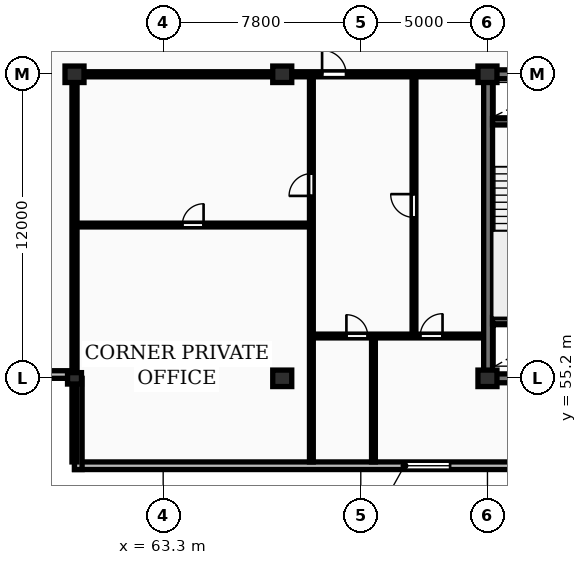
"""IFC4 building model, lengths in metres.
Left out: names, types, materials, properties, quantities, classifications, styles, units other than length and angle.
Written with IfcOpenShell. Run it as: python <this file> out.ifc"""

import sys

from ifc_helpers import new_model, si_unit, direction, frame, frame_2d, origin, origin_2d, place, context, subcontext, project, spatial, rectangle, extrude, element, fill, save


model = new_model("IFC4")
c1 = context("Model", 3, precision=1e-05, world=origin(), true_north=direction((0.0, 1.0)))
c2 = subcontext(c1, "Body", "Model", "MODEL_VIEW")
j1 = project(units=[si_unit("LENGTHUNIT", "METRE"), si_unit("PLANEANGLEUNIT", "RADIAN")], contexts=[c1])
p1 = place(None, origin())
s1 = spatial("IfcSite", under=j1, at=p1, CompositionType="ELEMENT")
p2 = place(p1, origin())
s2 = spatial("IfcBuilding", under=s1, at=p2, CompositionType="ELEMENT")
p3 = place(p2, frame((0.0, 0.0, 242.45)))
s3 = spatial("IfcBuildingStorey", under=s2, at=p3, CompositionType="ELEMENT", Elevation=242.45)
p4 = place(p3, frame((59.8, 55.2, 0.0), z_axis=(0.0, 0.0, 1.0), x_axis=(1.0, 0.0, 0.0)))
e1 = element("IfcColumn", 1, at=p4, inside=s3, PredefinedType="PILASTER", context=c2, shape_type="SweptSolid", body=[
    extrude(rectangle(XDim=0.55, YDim=0.45, at=origin_2d()), origin(), (0.0, 0.0, 1.0), 3.45),
])
for number, where, z_axis, x_axis in (
    (2, (59.8, 67.2, 0.0), (0.0, 0.0, 1.0), (1.0, 0.0, 0.0)),
    (3, (68.0, 55.2, 0.0), (0.0, 0.0, 1.0), (1.0, 0.0, 0.0)),
    (4, (68.0, 67.2, 0.0), (0.0, 0.0, 1.0), (1.0, 0.0, 0.0)),
    (5, (76.1, 55.2, 0.0), (0.0, 0.0, 1.0), (1.0, 0.0, 0.0)),
    (6, (76.1, 67.2, 0.0), (0.0, 0.0, 1.0), (1.0, 0.0, 0.0)),
):
    element("IfcColumn", number, at=place(p3, frame(where, z_axis=z_axis, x_axis=x_axis)), inside=s3, PredefinedType="COLUMN", context=c2, shape_type="SweptSolid", body=[
        extrude(rectangle(XDim=0.75, YDim=0.65, at=origin_2d()), origin(), (0.0, 0.0, 1.0), 3.45),
    ])
p5 = place(p3, frame((59.8, 51.75, 0.0), z_axis=(0.0, 0.0, 1.0), x_axis=(1.0, 0.0, 0.0)))
e7 = element("IfcWall", 7, at=p5, inside=s3, PredefinedType="STANDARD", context=c2, shape_type="SweptSolid", body=[
    extrude(rectangle(XDim=68.6, YDim=0.3, at=frame_2d((34.3, 0.0))), origin(), (0.0, 0.0, 1.0), 3.17),
])
p6 = place(p5, frame((13.025, 0.0, 0.85)))
e8 = element("IfcOpeningElement", 8, at=p6, cuts=e7, PredefinedType="OPENING", context=c2, shape_type="SweptSolid", body=[
    extrude(rectangle(XDim=1.8, YDim=1.8, at=frame_2d((0.9, 0.9))), frame((0.0, 0.16, 0.0), z_axis=(0.0, -1.0, 0.0), x_axis=(1.0, 0.0, 0.0)), (0.0, 0.0, 1.0), 0.32),
])
p7 = place(p5, frame((56.375, 0.0, 0.85)))
e9 = element("IfcOpeningElement", 9, at=p7, cuts=e7, PredefinedType="OPENING", context=c2, shape_type="SweptSolid", body=[
    extrude(rectangle(XDim=1.8, YDim=1.8, at=frame_2d((0.9, 0.9))), frame((0.0, 0.16, 0.0), z_axis=(0.0, -1.0, 0.0), x_axis=(1.0, 0.0, 0.0)), (0.0, 0.0, 1.0), 0.32),
])
p8 = place(p3, frame((56.2, 55.35, 0.0), z_axis=(0.0, 0.0, 1.0), x_axis=(1.0, 0.0, 0.0)))
e10 = element("IfcWall", 10, at=p8, inside=s3, PredefinedType="STANDARD", context=c2, shape_type="SweptSolid", body=[
    extrude(rectangle(XDim=3.6, YDim=0.3, at=frame_2d((1.8, 0.0))), origin(), (0.0, 0.0, 1.0), 3.17),
])
p9 = place(p3, frame((59.95, 55.2, 0.0), z_axis=(0.0, 0.0, 1.0), x_axis=(0.0, -1.0, 0.0)))
e11 = element("IfcWall", 11, at=p9, inside=s3, PredefinedType="STANDARD", context=c2, shape_type="SweptSolid", body=[
    extrude(rectangle(XDim=3.6, YDim=0.3, at=frame_2d((1.8, 0.0))), origin(), (0.0, 0.0, 1.0), 3.17),
])
p10 = place(p3, frame((75.95, 55.2, 0.0), z_axis=(0.0, 0.0, 1.0), x_axis=(1.0, 0.0, 0.0)))
e12 = element("IfcWall", 12, at=p10, inside=s3, PredefinedType="SHEAR", context=c2, shape_type="SweptSolid", body=[
    extrude(rectangle(XDim=36.3, YDim=0.35, at=frame_2d((18.15, 0.0))), origin(), (0.0, 0.0, 1.0), 3.45),
])
p11 = place(p3, frame((76.125, 55.375, 0.0), z_axis=(0.0, 0.0, 1.0), x_axis=(0.0, 1.0, 0.0)))
e13 = element("IfcWall", 13, at=p11, inside=s3, PredefinedType="SHEAR", context=c2, shape_type="SweptSolid", body=[
    extrude(rectangle(XDim=11.65, YDim=0.35, at=frame_2d((5.825, 0.0))), origin(), (0.0, 0.0, 1.0), 3.45),
])
p12 = place(p3, frame((75.95, 67.2, 0.0), z_axis=(0.0, 0.0, 1.0), x_axis=(1.0, 0.0, 0.0)))
e14 = element("IfcWall", 14, at=p12, inside=s3, PredefinedType="SHEAR", context=c2, shape_type="SweptSolid", body=[
    extrude(rectangle(XDim=36.3, YDim=0.35, at=frame_2d((18.15, 0.0))), origin(), (0.0, 0.0, 1.0), 3.45),
])
p13 = place(p12, frame((5.25, 0.0, 0.0)))
e15 = element("IfcOpeningElement", 15, at=p13, cuts=e14, PredefinedType="OPENING", context=c2, shape_type="SweptSolid", body=[
    extrude(rectangle(XDim=1.0, YDim=2.15, at=frame_2d((0.5, 1.075))), frame((0.0, 0.185, 0.0), z_axis=(0.0, -1.0, 0.0), x_axis=(1.0, 0.0, 0.0)), (0.0, 0.0, 1.0), 0.37),
])
p14 = place(p12, frame((21.6, 0.0, 0.0)))
e16 = element("IfcOpeningElement", 16, at=p14, cuts=e14, PredefinedType="OPENING", context=c2, shape_type="SweptSolid", body=[
    extrude(rectangle(XDim=1.5, YDim=2.2, at=frame_2d((0.75, 1.1))), frame((0.0, 0.185, 0.0), z_axis=(0.0, -1.0, 0.0), x_axis=(1.0, 0.0, 0.0)), (0.0, 0.0, 1.0), 0.37),
])
p15 = place(p12, frame((30.45, 0.0, 0.0)))
e17 = element("IfcOpeningElement", 17, at=p15, cuts=e14, PredefinedType="OPENING", context=c2, shape_type="SweptSolid", body=[
    extrude(rectangle(XDim=1.0, YDim=2.15, at=frame_2d((0.5, 1.075))), frame((0.0, 0.185, 0.0), z_axis=(0.0, -1.0, 0.0), x_axis=(1.0, 0.0, 0.0)), (0.0, 0.0, 1.0), 0.37),
])
for number, where, z_axis, x_axis in (
    (18, (76.3, 57.475, 0.0), (0.0, 0.0, 1.0), (1.0, 0.0, 0.0)),
    (19, (76.3, 65.325, 0.0), (0.0, 0.0, 1.0), (1.0, 0.0, 0.0)),
):
    element("IfcWall", number, at=place(p3, frame(where, z_axis=z_axis, x_axis=x_axis)), inside=s3, PredefinedType="SHEAR", context=c2, shape_type="SweptSolid", body=[
        extrude(rectangle(XDim=3.24, YDim=0.25, at=frame_2d((1.62, 0.0))), origin(), (0.0, 0.0, 1.0), 3.45),
    ])
p16 = place(p3, frame((59.8, 51.9, 0.0), z_axis=(0.0, 0.0, 1.0), x_axis=(0.0, 1.0, 0.0)))
e20 = element("IfcWall", 20, at=p16, inside=s3, PredefinedType="PARTITIONING", context=c2, shape_type="SweptSolid", body=[
    extrude(rectangle(XDim=15.3, YDim=0.2, at=frame_2d((7.65, 0.0))), origin(), (0.0, 0.0, 1.0), 2.477),
])
p17 = place(p3, frame((59.8, 61.25, 0.0), z_axis=(0.0, 0.0, 1.0), x_axis=(1.0, 0.0, 0.0)))
e21 = element("IfcWall", 21, at=p17, inside=s3, PredefinedType="PARTITIONING", context=c2, shape_type="SweptSolid", body=[
    extrude(rectangle(XDim=9.35, YDim=0.15, at=frame_2d((4.675, 0.0))), origin(), (0.0, 0.0, 1.0), 3.17),
])
p18 = place(p17, frame((4.255, 0.0, 0.0)))
e22 = element("IfcOpeningElement", 22, at=p18, cuts=e21, PredefinedType="OPENING", context=c2, shape_type="SweptSolid", body=[
    extrude(rectangle(XDim=0.84, YDim=2.04, at=frame_2d((0.42, 1.02))), frame((0.0, 0.085, 0.0), z_axis=(0.0, -1.0, 0.0), x_axis=(1.0, 0.0, 0.0)), (0.0, 0.0, 1.0), 0.17),
])
p19 = place(p3, frame((69.15, 51.9, 0.0), z_axis=(0.0, 0.0, 1.0), x_axis=(0.0, 1.0, 0.0)))
e23 = element("IfcWall", 23, at=p19, inside=s3, PredefinedType="PARTITIONING", context=c2, shape_type="SweptSolid", body=[
    extrude(rectangle(XDim=15.25, YDim=0.15, at=frame_2d((7.625, 0.0))), origin(), (0.0, 0.0, 1.0), 3.17),
])
p20 = place(p19, frame((10.5, 0.0, 0.0)))
e24 = element("IfcOpeningElement", 24, at=p20, cuts=e23, PredefinedType="OPENING", context=c2, shape_type="SweptSolid", body=[
    extrude(rectangle(XDim=0.88, YDim=2.06, at=frame_2d((0.44, 1.03))), frame((0.0, 0.085, 0.0), z_axis=(0.0, -1.0, 0.0), x_axis=(1.0, 0.0, 0.0)), (0.0, 0.0, 1.0), 0.17),
])
p21 = place(p3, frame((73.2, 56.87, 0.0), z_axis=(0.0, 0.0, 1.0), x_axis=(0.0, 1.0, 0.0)))
e25 = element("IfcWall", 25, at=p21, inside=s3, PredefinedType="PARTITIONING", context=c2, shape_type="SweptSolid", body=[
    extrude(rectangle(XDim=10.28, YDim=0.15, at=frame_2d((5.14, 0.0))), origin(), (0.0, 0.0, 1.0), 3.17),
])
p22 = place(p21, frame((4.68, 0.0, 0.0)))
e26 = element("IfcOpeningElement", 26, at=p22, cuts=e25, PredefinedType="OPENING", context=c2, shape_type="SweptSolid", body=[
    extrude(rectangle(XDim=0.92, YDim=2.08, at=frame_2d((0.46, 1.04))), frame((0.0, 0.085, 0.0), z_axis=(0.0, -1.0, 0.0), x_axis=(1.0, 0.0, 0.0)), (0.0, 0.0, 1.0), 0.17),
])
p23 = place(p3, frame((71.6, 51.9, 0.0), z_axis=(0.0, 0.0, 1.0), x_axis=(0.0, 1.0, 0.0)))
e27 = element("IfcWall", 27, at=p23, inside=s3, PredefinedType="PARTITIONING", context=c2, shape_type="SweptSolid", body=[
    extrude(rectangle(XDim=4.97, YDim=0.15, at=frame_2d((2.485, 0.0))), origin(), (0.0, 0.0, 1.0), 3.17),
])
p24 = place(p3, frame((69.17, 56.87, 0.0), z_axis=(0.0, 0.0, 1.0), x_axis=(1.0, 0.0, 0.0)))
e28 = element("IfcWall", 28, at=p24, inside=s3, PredefinedType="PARTITIONING", context=c2, shape_type="SweptSolid", body=[
    extrude(rectangle(XDim=6.76, YDim=0.15, at=frame_2d((3.38, 0.0))), origin(), (0.0, 0.0, 1.0), 3.17),
])
p25 = place(p24, frame((1.362, 0.0, 0.0)))
e29 = element("IfcOpeningElement", 29, at=p25, cuts=e28, PredefinedType="OPENING", context=c2, shape_type="SweptSolid", body=[
    extrude(rectangle(XDim=0.84, YDim=2.04, at=frame_2d((0.42, 1.02))), frame((0.0, 0.085, 0.0), z_axis=(0.0, -1.0, 0.0), x_axis=(1.0, 0.0, 0.0)), (0.0, 0.0, 1.0), 0.17),
])
p26 = place(p24, frame((4.277, 0.0, 0.0)))
e30 = element("IfcOpeningElement", 30, at=p26, cuts=e28, PredefinedType="OPENING", context=c2, shape_type="SweptSolid", body=[
    extrude(rectangle(XDim=0.88, YDim=2.06, at=frame_2d((0.44, 1.03))), frame((0.0, 0.085, 0.0), z_axis=(0.0, -1.0, 0.0), x_axis=(1.0, 0.0, 0.0)), (0.0, 0.0, 1.0), 0.17),
])
p27 = place(p3, frame((59.8, 67.2, 0.0), z_axis=(0.0, 0.0, 1.0), x_axis=(1.0, 0.0, 0.0)))
e31 = element("IfcWall", 31, at=p27, inside=s3, PredefinedType="PARTITIONING", context=c2, shape_type="SweptSolid", body=[
    extrude(rectangle(XDim=16.15, YDim=0.2, at=frame_2d((8.075, 0.0))), origin(), (0.0, 0.0, 1.0), 2.633),
])
p28 = place(p27, frame((9.772, 0.0, 0.0)))
e32 = element("IfcOpeningElement", 32, at=p28, cuts=e31, PredefinedType="OPENING", context=c2, shape_type="SweptSolid", body=[
    extrude(rectangle(XDim=0.95, YDim=2.15, at=frame_2d((0.475, 1.075))), frame((0.0, 0.11, 0.0), z_axis=(0.0, -1.0, 0.0), x_axis=(1.0, 0.0, 0.0)), (0.0, 0.0, 1.0), 0.22),
])
p29 = place(p6, origin())
e33 = element("IfcWindow", 33, at=p29, inside=s3, PartitioningType="SINGLE_PANEL", PredefinedType="WINDOW", context=c2, shape_type="SweptSolid", body=[
    extrude(rectangle(XDim=1.8, YDim=1.8, at=frame_2d((0.9, 0.9))), frame((0.0, 0.03, 0.0), z_axis=(0.0, -1.0, 0.0), x_axis=(1.0, 0.0, 0.0)), (0.0, 0.0, 1.0), 0.06),
])
fill(e8, e33)
p30 = place(p18, origin())
e34 = element("IfcDoor", 34, at=p30, inside=s3, OperationType="SINGLE_SWING_RIGHT", PredefinedType="DOOR", context=c2, shape_type="SweptSolid", body=[
    extrude(rectangle(XDim=0.84, YDim=2.04, at=frame_2d((0.42, 1.02))), frame((0.0, 0.025, 0.0), z_axis=(0.0, -1.0, 0.0), x_axis=(1.0, 0.0, 0.0)), (0.0, 0.0, 1.0), 0.05),
])
fill(e22, e34)
p31 = place(p20, origin())
e35 = element("IfcDoor", 35, at=p31, inside=s3, OperationType="SINGLE_SWING_LEFT", PredefinedType="DOOR", context=c2, shape_type="SweptSolid", body=[
    extrude(rectangle(XDim=0.88, YDim=2.06, at=frame_2d((0.44, 1.03))), frame((0.0, 0.025, 0.0), z_axis=(0.0, -1.0, 0.0), x_axis=(1.0, 0.0, 0.0)), (0.0, 0.0, 1.0), 0.05),
])
fill(e24, e35)
p32 = place(p22, origin())
e36 = element("IfcDoor", 36, at=p32, inside=s3, OperationType="SINGLE_SWING_RIGHT", PredefinedType="DOOR", context=c2, shape_type="SweptSolid", body=[
    extrude(rectangle(XDim=0.92, YDim=2.08, at=frame_2d((0.46, 1.04))), frame((0.0, 0.025, 0.0), z_axis=(0.0, -1.0, 0.0), x_axis=(1.0, 0.0, 0.0)), (0.0, 0.0, 1.0), 0.05),
])
fill(e26, e36)
p33 = place(p25, origin())
e37 = element("IfcDoor", 37, at=p33, inside=s3, OperationType="SINGLE_SWING_LEFT", PredefinedType="DOOR", context=c2, shape_type="SweptSolid", body=[
    extrude(rectangle(XDim=0.84, YDim=2.04, at=frame_2d((0.42, 1.02))), frame((0.0, 0.025, 0.0), z_axis=(0.0, -1.0, 0.0), x_axis=(1.0, 0.0, 0.0)), (0.0, 0.0, 1.0), 0.05),
])
fill(e29, e37)
p34 = place(p26, origin())
e38 = element("IfcDoor", 38, at=p34, inside=s3, OperationType="SINGLE_SWING_RIGHT", PredefinedType="DOOR", context=c2, shape_type="SweptSolid", body=[
    extrude(rectangle(XDim=0.88, YDim=2.06, at=frame_2d((0.44, 1.03))), frame((0.0, 0.025, 0.0), z_axis=(0.0, -1.0, 0.0), x_axis=(1.0, 0.0, 0.0)), (0.0, 0.0, 1.0), 0.05),
])
fill(e30, e38)
p35 = place(p28, origin())
e39 = element("IfcDoor", 39, at=p35, inside=s3, OperationType="SINGLE_SWING_LEFT", PredefinedType="DOOR", context=c2, shape_type="SweptSolid", body=[
    extrude(rectangle(XDim=0.95, YDim=2.15, at=frame_2d((0.475, 1.075))), frame((0.0, 0.025, 0.0), z_axis=(0.0, -1.0, 0.0), x_axis=(1.0, 0.0, 0.0)), (0.0, 0.0, 1.0), 0.05),
])
fill(e32, e39)
save(model, sys.argv[1])
